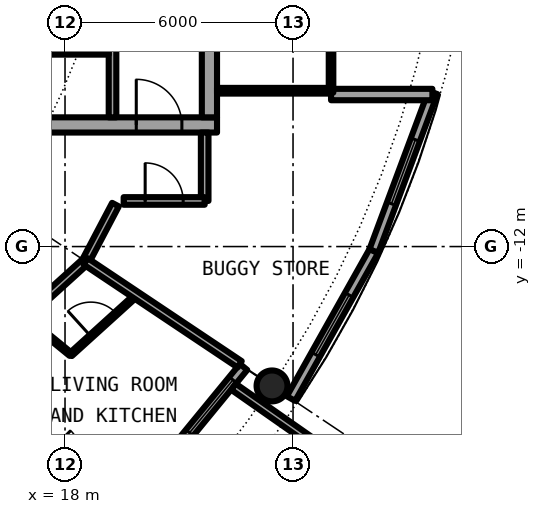
"""IFC4 building model, lengths in metres.
Left out: names, types, materials, properties, quantities, classifications, styles, units other than length and angle.
Written with IfcOpenShell. Run it as: python <this file> out.ifc"""

import sys

from ifc_helpers import new_model, si_unit, direction, frame, frame_2d, origin, origin_2d, place, context, subcontext, project, spatial, rectangle, hollow_circle, extrude, element, fill, save


model = new_model("IFC4")
c1 = context("Model", 3, precision=1e-05, world=origin(), true_north=direction((0.0, 1.0)))
c2 = subcontext(c1, "Body", "Model", "MODEL_VIEW")
j1 = project(units=[si_unit("LENGTHUNIT", "METRE"), si_unit("PLANEANGLEUNIT", "RADIAN")], contexts=[c1])
p1 = place(None, origin())
s1 = spatial("IfcSite", under=j1, at=p1, CompositionType="ELEMENT")
p2 = place(p1, origin())
s2 = spatial("IfcBuilding", under=s1, at=p2, CompositionType="ELEMENT")
p3 = place(p2, frame((0.0, 0.0, 227.95)))
s3 = spatial("IfcBuildingStorey", under=s2, at=p3, CompositionType="ELEMENT", Elevation=227.95)
p4 = place(p3, frame((23.448, -15.667, 0.0), z_axis=(0.0, 0.0, 1.0), x_axis=(1.0, 0.0, 0.0)))
e1 = element("IfcColumn", 1, at=p4, inside=s3, PredefinedType="COLUMN", context=c2, shape_type="SweptSolid", body=[
    extrude(hollow_circle(Radius=0.406, WallThickness=0.03, at=origin_2d()), origin(), (0.0, 0.0, 1.0), 3.05),
])
p5 = place(p3, frame((19.304, -19.304, 0.0), z_axis=(0.0, 0.0, 1.0), x_axis=(0.634382322723, 0.773019449054, 0.0)))
e2 = element("IfcWall", 2, at=p5, inside=s3, PredefinedType="SOLIDWALL", context=c2, shape_type="SweptSolid", body=[
    extrude(rectangle(XDim=5.352, YDim=0.25, at=frame_2d((2.676, 0.0))), origin(), (0.0, 0.0, 1.0), 2.7),
])
p6 = place(p5, frame((0.841, 0.0, 0.0)))
e3 = element("IfcOpeningElement", 3, at=p6, cuts=e2, PredefinedType="OPENING", context=c2, shape_type="SweptSolid", body=[
    extrude(rectangle(XDim=1.0, YDim=2.2, at=frame_2d((0.5, 1.1))), frame((0.0, 0.135, 0.0), z_axis=(0.0, -1.0, 0.0), x_axis=(1.0, 0.0, 0.0)), (0.0, 0.0, 1.0), 0.27),
])
p7 = place(p5, frame((3.111, 0.0, 0.3)))
e4 = element("IfcOpeningElement", 4, at=p7, cuts=e2, PredefinedType="OPENING", context=c2, shape_type="SweptSolid", body=[
    extrude(rectangle(XDim=1.8, YDim=2.1, at=frame_2d((0.9, 1.05))), frame((0.0, 0.135, 0.0), z_axis=(0.0, -1.0, 0.0), x_axis=(1.0, 0.0, 0.0)), (0.0, 0.0, 1.0), 0.27),
])
p8 = place(p3, frame((22.433, -15.688, -0.03), z_axis=(0.0, 0.0, 1.0), x_axis=(0.819373043115, -0.573260687834, 0.0)))
e5 = element("IfcWall", 5, at=p8, inside=s3, PredefinedType="SOLIDWALL", context=c2, shape_type="SweptSolid", body=[
    extrude(rectangle(XDim=2.925, YDim=0.2, at=frame_2d((1.463, 0.0))), origin(), (0.0, 0.0, 1.0), 2.73),
])
p9 = place(p3, frame((23.946, -16.0, 0.0), z_axis=(0.0, 0.0, 1.0), x_axis=(0.489696356642, 0.871893042919, 0.0)))
e6 = element("IfcWall", 6, at=p9, inside=s3, PredefinedType="SOLIDWALL", context=c2, shape_type="SweptSolid", body=[
    extrude(rectangle(XDim=4.454, YDim=0.25, at=frame_2d((2.227, 0.0))), origin(), (0.0, 0.0, 1.0), 2.7),
])
p10 = place(p9, frame((1.327, 0.0, 0.3)))
e7 = element("IfcOpeningElement", 7, at=p10, cuts=e6, PredefinedType="OPENING", context=c2, shape_type="SweptSolid", body=[
    extrude(rectangle(XDim=1.8, YDim=2.1, at=frame_2d((0.9, 1.05))), frame((0.0, 0.135, 0.0), z_axis=(0.0, -1.0, 0.0), x_axis=(1.0, 0.0, 0.0)), (0.0, 0.0, 1.0), 0.27),
])
p11 = place(p3, frame((26.127, -12.117, 0.0), z_axis=(0.0, 0.0, 1.0), x_axis=(0.349247811493, 0.937030397675, 0.0)))
e8 = element("IfcWall", 8, at=p11, inside=s3, PredefinedType="SOLIDWALL", context=c2, shape_type="SweptSolid", body=[
    extrude(rectangle(XDim=4.452, YDim=0.25, at=frame_2d((2.226, 0.0))), origin(), (0.0, 0.0, 1.0), 2.7),
])
p12 = place(p11, frame((1.327, 0.0, 0.3)))
e9 = element("IfcOpeningElement", 9, at=p12, cuts=e8, PredefinedType="OPENING", context=c2, shape_type="SweptSolid", body=[
    extrude(rectangle(XDim=1.8, YDim=2.1, at=frame_2d((0.9, 1.05))), frame((0.0, 0.135, 0.0), z_axis=(0.0, -1.0, 0.0), x_axis=(1.0, 0.0, 0.0)), (0.0, 0.0, 1.0), 0.27),
])
p13 = place(p3, frame((25.0, -8.0, 0.0), z_axis=(0.0, 0.0, 1.0), x_axis=(1.0, 0.0, 0.0)))
e10 = element("IfcWall", 10, at=p13, inside=s3, PredefinedType="SOLIDWALL", context=c2, shape_type="SweptSolid", body=[
    extrude(rectangle(XDim=2.667, YDim=0.3, at=frame_2d((1.333, 0.0))), origin(), (0.0, 0.0, 1.0), 2.7),
])
p14 = place(p3, frame((8.6, -8.8, 0.0), z_axis=(0.0, 0.0, 1.0), x_axis=(1.0, 0.0, 0.0)))
e11 = element("IfcWall", 11, at=p14, inside=s3, PredefinedType="SHEAR", context=c2, shape_type="SweptSolid", body=[
    extrude(rectangle(XDim=13.4, YDim=0.4, at=frame_2d((6.7, 0.0))), origin(), (0.0, 0.0, 1.0), 3.05),
])
p15 = place(p14, frame((11.275, 0.0, 0.0)))
e12 = element("IfcOpeningElement", 12, at=p15, cuts=e11, PredefinedType="OPENING", context=c2, shape_type="SweptSolid", body=[
    extrude(rectangle(XDim=1.2, YDim=2.3, at=frame_2d((0.6, 1.15))), frame((0.0, 0.21, 0.0), z_axis=(0.0, -1.0, 0.0), x_axis=(1.0, 0.0, 0.0)), (0.0, 0.0, 1.0), 0.42),
])
p16 = place(p3, frame((21.8, 8.6, 0.0), z_axis=(0.0, 0.0, 1.0), x_axis=(0.0, -1.0, 0.0)))
e13 = element("IfcWall", 13, at=p16, inside=s3, PredefinedType="SHEAR", context=c2, shape_type="SweptSolid", body=[
    extrude(rectangle(XDim=17.2, YDim=0.4, at=frame_2d((8.6, 0.0))), origin(), (0.0, 0.0, 1.0), 3.05),
])
p17 = place(p16, frame((7.7, 0.0, 0.0)))
e14 = element("IfcOpeningElement", 14, at=p17, cuts=e13, PredefinedType="OPENING", context=c2, shape_type="SweptSolid", body=[
    extrude(rectangle(XDim=1.8, YDim=2.3, at=frame_2d((0.9, 1.15))), frame((0.0, 0.21, 0.0), z_axis=(0.0, -1.0, 0.0), x_axis=(1.0, 0.0, 0.0)), (0.0, 0.0, 1.0), 0.42),
])
p18 = place(p3, frame((19.25, -8.6, 0.0), z_axis=(0.0, 0.0, 1.0), x_axis=(0.0, 1.0, 0.0)))
e15 = element("IfcWall", 15, at=p18, inside=s3, PredefinedType="SOLIDWALL", context=c2, shape_type="SweptSolid", body=[
    extrude(rectangle(XDim=7.025, YDim=0.2, at=frame_2d((3.513, 0.0))), origin(), (0.0, 0.0, 1.0), 2.7),
])
p19 = place(p18, frame((2.35, 0.0, 0.0)))
e16 = element("IfcOpeningElement", 16, at=p19, cuts=e15, PredefinedType="OPENING", context=c2, shape_type="SweptSolid", body=[
    extrude(rectangle(XDim=1.1, YDim=2.3, at=frame_2d((0.55, 1.15))), frame((0.0, 0.11, 0.0), z_axis=(0.0, -1.0, 0.0), x_axis=(1.0, 0.0, 0.0)), (0.0, 0.0, 1.0), 0.22),
])
p20 = place(p3, frame((15.45, -6.875, 0.0), z_axis=(0.0, 0.0, 1.0), x_axis=(1.0, 0.0, 0.0)))
e17 = element("IfcWall", 17, at=p20, inside=s3, PredefinedType="PARTITIONING", context=c2, shape_type="SweptSolid", body=[
    extrude(rectangle(XDim=3.7, YDim=0.15, at=frame_2d((1.85, 0.0))), origin(), (0.0, 0.0, 1.0), 2.7),
])
p21 = place(p20, frame((1.4, 0.0, 0.0)))
e18 = element("IfcOpeningElement", 18, at=p21, cuts=e17, PredefinedType="OPENING", context=c2, shape_type="SweptSolid", body=[
    extrude(rectangle(XDim=0.9, YDim=2.3, at=frame_2d((0.45, 1.15))), frame((0.0, 0.085, 0.0), z_axis=(0.0, -1.0, 0.0), x_axis=(1.0, 0.0, 0.0)), (0.0, 0.0, 1.0), 0.17),
])
p22 = place(p3, frame((22.0, -7.9, 0.0), z_axis=(0.0, 0.0, 1.0), x_axis=(1.0, 0.0, 0.0)))
e19 = element("IfcWall", 19, at=p22, inside=s3, PredefinedType="PARTITIONING", context=c2, shape_type="SweptSolid", body=[
    extrude(rectangle(XDim=2.94, YDim=0.15, at=frame_2d((1.47, 0.0))), origin(), (0.0, 0.0, 1.0), 2.7),
])
p23 = place(p3, frame((25.0, 7.95, 0.0), z_axis=(0.0, 0.0, 1.0), x_axis=(0.0, -1.0, 0.0)))
e20 = element("IfcWall", 20, at=p23, inside=s3, PredefinedType="PARTITIONING", context=c2, shape_type="SweptSolid", body=[
    extrude(rectangle(XDim=15.9, YDim=0.12, at=frame_2d((7.95, 0.0))), origin(), (0.0, 0.0, 1.0), 2.7),
])
p24 = place(p23, frame((6.75, 0.0, 0.0)))
e21 = element("IfcOpeningElement", 21, at=p24, cuts=e20, PredefinedType="OPENING", context=c2, shape_type="SweptSolid", body=[
    extrude(rectangle(XDim=2.4, YDim=2.3, at=frame_2d((1.2, 1.15))), frame((0.0, 0.07, 0.0), z_axis=(0.0, -1.0, 0.0), x_axis=(1.0, 0.0, 0.0)), (0.0, 0.0, 1.0), 0.14),
])
p25 = place(p23, frame((11.55, 0.0, 0.1)))
e22 = element("IfcOpeningElement", 22, at=p25, cuts=e20, PredefinedType="OPENING", context=c2, shape_type="SweptSolid", body=[
    extrude(rectangle(XDim=3.4, YDim=2.35, at=frame_2d((1.7, 1.175))), frame((0.0, 0.07, 0.0), z_axis=(0.0, -1.0, 0.0), x_axis=(1.0, 0.0, 0.0)), (0.0, 0.0, 1.0), 0.14),
])
p26 = place(p23, frame((0.95, 0.0, 0.1)))
e23 = element("IfcOpeningElement", 23, at=p26, cuts=e20, PredefinedType="OPENING", context=c2, shape_type="SweptSolid", body=[
    extrude(rectangle(XDim=3.4, YDim=2.35, at=frame_2d((1.7, 1.175))), frame((0.0, 0.07, 0.0), z_axis=(0.0, -1.0, 0.0), x_axis=(1.0, 0.0, 0.0)), (0.0, 0.0, 1.0), 0.14),
])
p27 = place(p3, frame((18.147, -14.844, 0.0), z_axis=(0.0, 0.0, 1.0), x_axis=(0.741080073381, 0.671416655169, 0.0)))
e24 = element("IfcWall", 24, at=p27, inside=s3, PredefinedType="PARTITIONING", context=c2, shape_type="SweptSolid", body=[
    extrude(rectangle(XDim=2.323, YDim=0.1, at=frame_2d((1.162, 0.0))), origin(), (0.0, 0.0, 1.0), 2.7),
])
p28 = place(p27, frame((0.718, 0.0, 0.0)))
e25 = element("IfcOpeningElement", 25, at=p28, cuts=e24, PredefinedType="OPENING", context=c2, shape_type="SweptSolid", body=[
    extrude(rectangle(XDim=0.9, YDim=2.3, at=frame_2d((0.45, 1.15))), frame((0.0, 0.06, 0.0), z_axis=(0.0, -1.0, 0.0), x_axis=(1.0, 0.0, 0.0)), (0.0, 0.0, 1.0), 0.12),
])
p29 = place(p3, frame((18.542, -12.389, 0.0), z_axis=(0.0, 0.0, 1.0), x_axis=(0.465812036273, 0.88488369115, 0.0)))
e26 = element("IfcWall", 26, at=p29, inside=s3, PredefinedType="PARTITIONING", context=c2, shape_type="SweptSolid", body=[
    extrude(rectangle(XDim=1.687, YDim=0.2, at=frame_2d((0.844, 0.0))), origin(), (0.0, 0.0, 1.0), 2.7),
])
p30 = place(p3, frame((21.675, -10.8, 0.0), z_axis=(0.0, 0.0, 1.0), x_axis=(0.0, 1.0, 0.0)))
e27 = element("IfcWall", 27, at=p30, inside=s3, PredefinedType="PARTITIONING", context=c2, shape_type="SweptSolid", body=[
    extrude(rectangle(XDim=1.8, YDim=0.2, at=frame_2d((0.9, 0.0))), origin(), (0.0, 0.0, 1.0), 2.7),
])
p31 = place(p3, frame((10.512, -19.667, 0.0), z_axis=(0.0, 0.0, 1.0), x_axis=(0.740947367223, 0.671563101283, 0.0)))
e28 = element("IfcWall", 28, at=p31, inside=s3, PredefinedType="PARTITIONING", context=c2, shape_type="SweptSolid", body=[
    extrude(rectangle(XDim=10.837, YDim=0.2, at=frame_2d((5.419, 0.0))), origin(), (0.0, 0.0, 1.0), 2.7),
])
p32 = place(p31, frame((3.835, 0.0, 0.0)))
e29 = element("IfcOpeningElement", 29, at=p32, cuts=e28, PredefinedType="OPENING", context=c2, shape_type="SweptSolid", body=[
    extrude(rectangle(XDim=1.0, YDim=2.3, at=frame_2d((0.5, 1.15))), frame((0.0, 0.11, 0.0), z_axis=(0.0, -1.0, 0.0), x_axis=(1.0, 0.0, 0.0)), (0.0, 0.0, 1.0), 0.22),
])
p33 = place(p3, frame((19.543, -10.8, 0.0), z_axis=(0.0, 0.0, 1.0), x_axis=(1.0, 0.0, 0.0)))
e30 = element("IfcWall", 30, at=p33, inside=s3, PredefinedType="PARTITIONING", context=c2, shape_type="SweptSolid", body=[
    extrude(rectangle(XDim=2.132, YDim=0.2, at=frame_2d((1.066, 0.0))), origin(), (0.0, 0.0, 1.0), 2.7),
])
p34 = place(p33, frame((0.566, 0.0, 0.0)))
e31 = element("IfcOpeningElement", 31, at=p34, cuts=e30, PredefinedType="OPENING", context=c2, shape_type="SweptSolid", body=[
    extrude(rectangle(XDim=1.0, YDim=2.3, at=frame_2d((0.5, 1.15))), frame((0.0, 0.11, 0.0), z_axis=(0.0, -1.0, 0.0), x_axis=(1.0, 0.0, 0.0)), (0.0, 0.0, 1.0), 0.22),
])
p35 = place(p3, frame((16.43, -16.398, 0.0), z_axis=(0.0, 0.0, 1.0), x_axis=(0.707722727509, -0.706490297858, 0.0)))
e32 = element("IfcWall", 32, at=p35, inside=s3, PredefinedType="PARTITIONING", context=c2, shape_type="SweptSolid", body=[
    extrude(rectangle(XDim=3.962, YDim=0.1, at=frame_2d((1.981, 0.0))), origin(), (0.0, 0.0, 1.0), 2.7),
])
p36 = place(p35, frame((1.531, 0.0, 0.0)))
e33 = element("IfcOpeningElement", 33, at=p36, cuts=e32, PredefinedType="OPENING", context=c2, shape_type="SweptSolid", body=[
    extrude(rectangle(XDim=0.9, YDim=2.3, at=frame_2d((0.45, 1.15))), frame((0.0, 0.06, 0.0), z_axis=(0.0, -1.0, 0.0), x_axis=(1.0, 0.0, 0.0)), (0.0, 0.0, 1.0), 0.12),
])
p37 = place(p3, frame((16.936, -13.845, 0.0), z_axis=(0.0, 0.0, 1.0), x_axis=(0.774283039722, -0.632839453889, 0.0)))
e34 = element("IfcWall", 34, at=p37, inside=s3, PredefinedType="PARTITIONING", context=c2, shape_type="SweptSolid", body=[
    extrude(rectangle(XDim=1.569, YDim=0.1, at=frame_2d((0.785, 0.0))), origin(), (0.0, 0.0, 1.0), 2.7),
])
p38 = place(p3, frame((18.542, -12.389, 0.0), z_axis=(0.0, 0.0, 1.0), x_axis=(0.831387096605, -0.55569370664, 0.0)))
e35 = element("IfcWall", 35, at=p38, inside=s3, PredefinedType="PARTITIONING", context=c2, shape_type="SweptSolid", body=[
    extrude(rectangle(XDim=4.875, YDim=0.2, at=frame_2d((2.438, 0.0))), origin(), (0.0, 0.0, 1.0), 2.7),
])
p39 = place(p7, origin())
e36 = element("IfcWindow", 36, at=p39, inside=s3, PartitioningType="SINGLE_PANEL", PredefinedType="WINDOW", context=c2, shape_type="SweptSolid", body=[
    extrude(rectangle(XDim=1.8, YDim=2.1, at=frame_2d((0.9, 1.05))), frame((0.0, 0.03, 0.0), z_axis=(0.0, -1.0, 0.0), x_axis=(1.0, 0.0, 0.0)), (0.0, 0.0, 1.0), 0.06),
])
fill(e4, e36)
p40 = place(p10, origin())
e37 = element("IfcWindow", 37, at=p40, inside=s3, PartitioningType="SINGLE_PANEL", PredefinedType="WINDOW", context=c2, shape_type="SweptSolid", body=[
    extrude(rectangle(XDim=1.8, YDim=2.1, at=frame_2d((0.9, 1.05))), frame((0.0, 0.03, 0.0), z_axis=(0.0, -1.0, 0.0), x_axis=(1.0, 0.0, 0.0)), (0.0, 0.0, 1.0), 0.06),
])
fill(e7, e37)
p41 = place(p12, origin())
e38 = element("IfcWindow", 38, at=p41, inside=s3, PartitioningType="SINGLE_PANEL", PredefinedType="WINDOW", context=c2, shape_type="SweptSolid", body=[
    extrude(rectangle(XDim=1.8, YDim=2.1, at=frame_2d((0.9, 1.05))), frame((0.0, 0.03, 0.0), z_axis=(0.0, -1.0, 0.0), x_axis=(1.0, 0.0, 0.0)), (0.0, 0.0, 1.0), 0.06),
])
fill(e9, e38)
p42 = place(p21, origin())
e39 = element("IfcDoor", 39, at=p42, inside=s3, OperationType="SINGLE_SWING_LEFT", PredefinedType="DOOR", context=c2, shape_type="SweptSolid", body=[
    extrude(rectangle(XDim=0.9, YDim=2.3, at=frame_2d((0.45, 1.15))), frame((0.0, 0.025, 0.0), z_axis=(0.0, -1.0, 0.0), x_axis=(1.0, 0.0, 0.0)), (0.0, 0.0, 1.0), 0.05),
])
fill(e18, e39)
p43 = place(p15, origin())
e40 = element("IfcDoor", 40, at=p43, inside=s3, OperationType="SINGLE_SWING_LEFT", PredefinedType="DOOR", context=c2, shape_type="SweptSolid", body=[
    extrude(rectangle(XDim=1.2, YDim=2.3, at=frame_2d((0.6, 1.15))), frame((0.0, 0.025, 0.0), z_axis=(0.0, -1.0, 0.0), x_axis=(1.0, 0.0, 0.0)), (0.0, 0.0, 1.0), 0.05),
])
fill(e12, e40)
p44 = place(p25, origin())
e41 = element("IfcWindow", 41, at=p44, inside=s3, PartitioningType="SINGLE_PANEL", PredefinedType="WINDOW", context=c2, shape_type="SweptSolid", body=[
    extrude(rectangle(XDim=3.4, YDim=2.35, at=frame_2d((1.7, 1.175))), frame((0.0, 0.03, 0.0), z_axis=(0.0, -1.0, 0.0), x_axis=(1.0, 0.0, 0.0)), (0.0, 0.0, 1.0), 0.06),
])
fill(e22, e41)
p45 = place(p28, origin())
e42 = element("IfcDoor", 42, at=p45, inside=s3, OperationType="SINGLE_SWING_RIGHT", PredefinedType="DOOR", context=c2, shape_type="SweptSolid", body=[
    extrude(rectangle(XDim=0.9, YDim=2.3, at=frame_2d((0.45, 1.15))), frame((0.0, 0.025, 0.0), z_axis=(0.0, -1.0, 0.0), x_axis=(1.0, 0.0, 0.0)), (0.0, 0.0, 1.0), 0.05),
])
fill(e25, e42)
p46 = place(p34, origin())
e43 = element("IfcDoor", 43, at=p46, inside=s3, OperationType="SINGLE_SWING_RIGHT", PredefinedType="DOOR", context=c2, shape_type="SweptSolid", body=[
    extrude(rectangle(XDim=1.0, YDim=2.3, at=frame_2d((0.5, 1.15))), frame((0.0, 0.025, 0.0), z_axis=(0.0, -1.0, 0.0), x_axis=(1.0, 0.0, 0.0)), (0.0, 0.0, 1.0), 0.05),
])
fill(e31, e43)
save(model, sys.argv[1])
